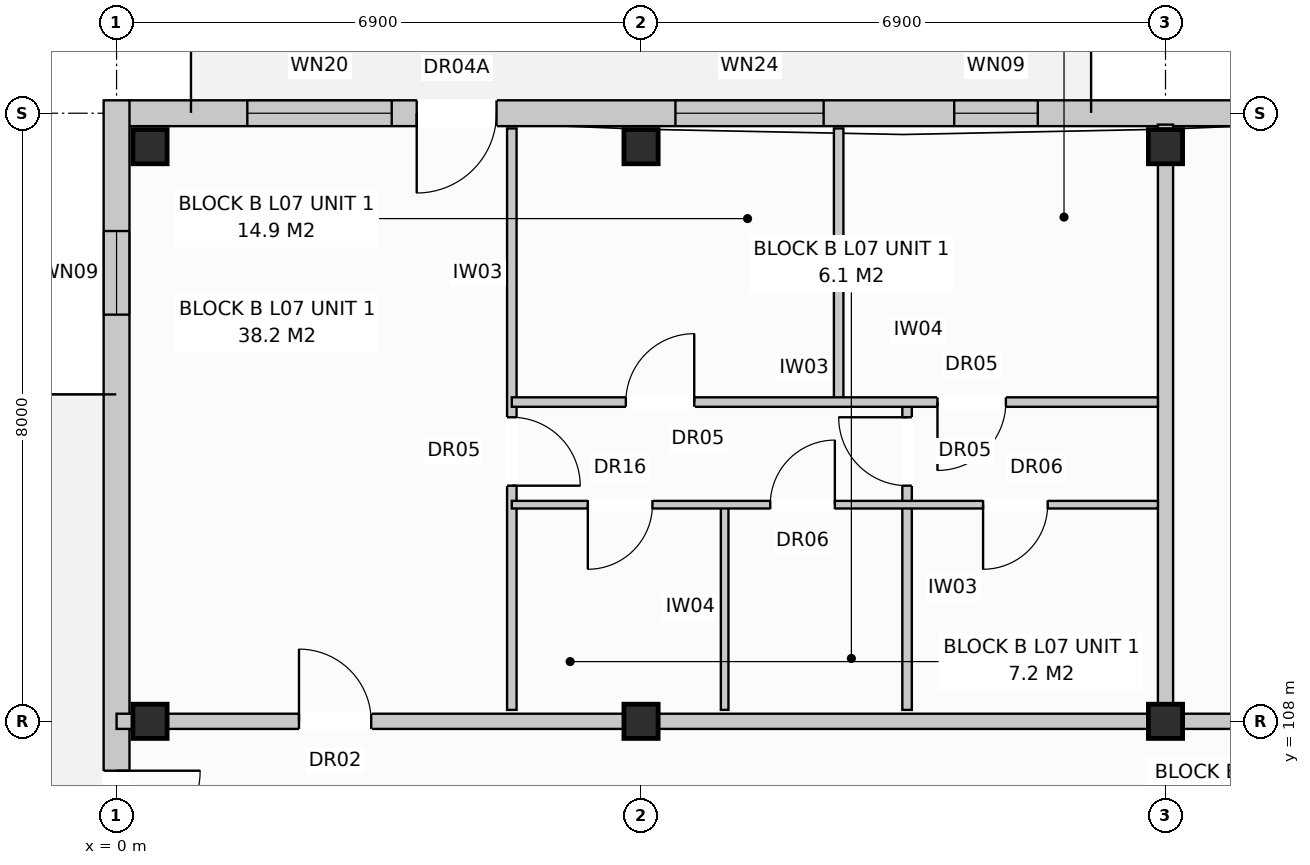
"""IFC4 building model, lengths in metres.
Left out: names, types, materials, properties, quantities, classifications, styles, units other than length and angle.
Written with IfcOpenShell. Run it as: python <this file> out.ifc"""

import sys

from ifc_helpers import new_model, si_unit, direction, frame, frame_2d, origin, origin_with_axes, origin_2d, place, context, subcontext, project, spatial, rectangle, extrude, element, fill, save


model = new_model("IFC4")
c1 = context("Model", 3, precision=1e-05, world=origin(), true_north=direction((0.0, 1.0)))
c2 = subcontext(c1, "Body", "Model", "MODEL_VIEW")
j1 = project(units=[si_unit("LENGTHUNIT", "METRE"), si_unit("PLANEANGLEUNIT", "RADIAN")], contexts=[c1])
p1 = place(None, origin())
s1 = spatial("IfcSite", under=j1, at=p1, CompositionType="ELEMENT")
p2 = place(p1, origin())
s2 = spatial("IfcBuilding", under=s1, at=p2, CompositionType="ELEMENT")
p3 = place(p2, frame((0.0, 0.0, 24.0)))
s3 = spatial("IfcBuildingStorey", under=s2, at=p3, CompositionType="ELEMENT", Elevation=24.0)
for number, where, z_axis, x_axis in (
    (1, (0.44, 108.0, 0.0), (0.0, 0.0, 1.0), (1.0, 0.0, 0.0)),
    (2, (0.44, 115.56, 0.0), (0.0, 0.0, 1.0), (1.0, 0.0, 0.0)),
    (3, (6.9, 108.0, 0.0), (0.0, 0.0, 1.0), (1.0, 0.0, 0.0)),
    (4, (6.9, 115.56, 0.0), (0.0, 0.0, 1.0), (1.0, 0.0, 0.0)),
    (5, (13.8, 108.0, 0.0), (0.0, 0.0, 1.0), (1.0, 0.0, 0.0)),
    (6, (13.8, 115.56, 0.0), (0.0, 0.0, 1.0), (1.0, 0.0, 0.0)),
):
    element("IfcColumn", number, at=place(p3, frame(where, z_axis=z_axis, x_axis=x_axis)), inside=s3, PredefinedType="COLUMN", context=c2, shape_type="SweptSolid", body=[
        extrude(rectangle(XDim=0.45, YDim=0.45, at=origin_2d()), origin(), (0.0, 0.0, 1.0), 3.2),
    ])
p4 = place(p3, frame((0.16, 116.0, 0.0), z_axis=(0.0, 0.0, 1.0), x_axis=(1.0, 0.0, 0.0)))
e7 = element("IfcWall", 7, at=p4, inside=s3, PredefinedType="STANDARD", context=c2, shape_type="SweptSolid", body=[
    extrude(rectangle(XDim=41.08, YDim=0.34, at=frame_2d((20.54, 0.0))), origin(), (0.0, 0.0, 1.0), 2.95),
])
p5 = place(p4, frame((3.789, 0.0, 0.0)))
e8 = element("IfcOpeningElement", 8, at=p5, cuts=e7, PredefinedType="OPENING", context=c2, shape_type="SweptSolid", body=[
    extrude(rectangle(XDim=1.05, YDim=2.12, at=frame_2d((0.525, 1.06))), frame((0.0, 0.182, 0.0), z_axis=(0.0, -1.0, 0.0), x_axis=(1.0, 0.0, 0.0)), (0.0, 0.0, 1.0), 0.364),
])
p6 = place(p4, frame((18.689, 0.0, 0.0)))
e9 = element("IfcOpeningElement", 9, at=p6, cuts=e7, PredefinedType="OPENING", context=c2, shape_type="SweptSolid", body=[
    extrude(rectangle(XDim=1.05, YDim=2.12, at=frame_2d((0.525, 1.06))), frame((0.0, 0.182, 0.0), z_axis=(0.0, -1.0, 0.0), x_axis=(1.0, 0.0, 0.0)), (0.0, 0.0, 1.0), 0.364),
])
p7 = place(p4, frame((29.089, 0.0, 0.0)))
e10 = element("IfcOpeningElement", 10, at=p7, cuts=e7, PredefinedType="OPENING", context=c2, shape_type="SweptSolid", body=[
    extrude(rectangle(XDim=1.05, YDim=2.12, at=frame_2d((0.525, 1.06))), frame((0.0, 0.182, 0.0), z_axis=(0.0, -1.0, 0.0), x_axis=(1.0, 0.0, 0.0)), (0.0, 0.0, 1.0), 0.364),
])
p8 = place(p4, frame((1.56, 0.0, 0.8)))
e11 = element("IfcOpeningElement", 11, at=p8, cuts=e7, PredefinedType="OPENING", context=c2, shape_type="SweptSolid", body=[
    extrude(rectangle(XDim=1.9, YDim=1.85, at=frame_2d((0.95, 0.925))), frame((0.0, 0.182, 0.0), z_axis=(0.0, -1.0, 0.0), x_axis=(1.0, 0.0, 0.0)), (0.0, 0.0, 1.0), 0.364),
])
p9 = place(p4, frame((7.192, 0.0, 0.8)))
e12 = element("IfcOpeningElement", 12, at=p9, cuts=e7, PredefinedType="OPENING", context=c2, shape_type="SweptSolid", body=[
    extrude(rectangle(XDim=1.95, YDim=1.65, at=frame_2d((0.975, 0.825))), frame((0.0, 0.182, 0.0), z_axis=(0.0, -1.0, 0.0), x_axis=(1.0, 0.0, 0.0)), (0.0, 0.0, 1.0), 0.364),
])
p10 = place(p4, frame((10.86, 0.0, 0.72)))
e13 = element("IfcOpeningElement", 13, at=p10, cuts=e7, PredefinedType="OPENING", context=c2, shape_type="SweptSolid", body=[
    extrude(rectangle(XDim=1.1, YDim=1.5, at=frame_2d((0.55, 0.75))), frame((0.0, 0.182, 0.0), z_axis=(0.0, -1.0, 0.0), x_axis=(1.0, 0.0, 0.0)), (0.0, 0.0, 1.0), 0.364),
])
p11 = place(p4, frame((15.86, 0.0, 0.8)))
e14 = element("IfcOpeningElement", 14, at=p11, cuts=e7, PredefinedType="OPENING", context=c2, shape_type="SweptSolid", body=[
    extrude(rectangle(XDim=1.9, YDim=1.85, at=frame_2d((0.95, 0.925))), frame((0.0, 0.182, 0.0), z_axis=(0.0, -1.0, 0.0), x_axis=(1.0, 0.0, 0.0)), (0.0, 0.0, 1.0), 0.364),
])
p12 = place(p4, frame((21.535, 0.0, 0.8)))
e15 = element("IfcOpeningElement", 15, at=p12, cuts=e7, PredefinedType="OPENING", context=c2, shape_type="SweptSolid", body=[
    extrude(rectangle(XDim=1.95, YDim=1.65, at=frame_2d((0.975, 0.825))), frame((0.0, 0.182, 0.0), z_axis=(0.0, -1.0, 0.0), x_axis=(1.0, 0.0, 0.0)), (0.0, 0.0, 1.0), 0.364),
])
p13 = place(p4, frame((25.61, 0.0, 0.72)))
e16 = element("IfcOpeningElement", 16, at=p13, cuts=e7, PredefinedType="OPENING", context=c2, shape_type="SweptSolid", body=[
    extrude(rectangle(XDim=1.1, YDim=1.5, at=frame_2d((0.55, 0.75))), frame((0.0, 0.182, 0.0), z_axis=(0.0, -1.0, 0.0), x_axis=(1.0, 0.0, 0.0)), (0.0, 0.0, 1.0), 0.364),
])
p14 = place(p4, frame((31.36, 0.0, 0.72)))
e17 = element("IfcOpeningElement", 17, at=p14, cuts=e7, PredefinedType="OPENING", context=c2, shape_type="SweptSolid", body=[
    extrude(rectangle(XDim=1.9, YDim=1.85, at=frame_2d((0.95, 0.925))), frame((0.0, 0.182, 0.0), z_axis=(0.0, -1.0, 0.0), x_axis=(1.0, 0.0, 0.0)), (0.0, 0.0, 1.0), 0.364),
])
p15 = place(p4, frame((35.335, 0.0, 0.8)))
e18 = element("IfcOpeningElement", 18, at=p15, cuts=e7, PredefinedType="OPENING", context=c2, shape_type="SweptSolid", body=[
    extrude(rectangle(XDim=1.95, YDim=1.65, at=frame_2d((0.975, 0.825))), frame((0.0, 0.182, 0.0), z_axis=(0.0, -1.0, 0.0), x_axis=(1.0, 0.0, 0.0)), (0.0, 0.0, 1.0), 0.364),
])
p16 = place(p4, frame((39.16, 0.0, 0.72)))
e19 = element("IfcOpeningElement", 19, at=p16, cuts=e7, PredefinedType="OPENING", context=c2, shape_type="SweptSolid", body=[
    extrude(rectangle(XDim=1.1, YDim=1.5, at=frame_2d((0.55, 0.75))), frame((0.0, 0.182, 0.0), z_axis=(0.0, -1.0, 0.0), x_axis=(1.0, 0.0, 0.0)), (0.0, 0.0, 1.0), 0.364),
])
p17 = place(p3, frame((0.0, 97.43, 0.0), z_axis=(0.0, 0.0, 1.0), x_axis=(0.0, 1.0, 0.0)))
e20 = element("IfcWall", 20, at=p17, inside=s3, PredefinedType="STANDARD", context=c2, shape_type="SweptSolid", body=[
    extrude(rectangle(XDim=18.74, YDim=0.34, at=frame_2d((9.37, 0.0))), origin(), (0.0, 0.0, 1.0), 2.95),
])
p18 = place(p17, frame((8.82, 0.0, 0.0)))
e21 = element("IfcOpeningElement", 21, at=p18, cuts=e20, PredefinedType="OPENING", context=c2, shape_type="SweptSolid", body=[
    extrude(rectangle(XDim=1.1, YDim=2.1, at=frame_2d((0.55, 1.05))), frame((0.0, 0.182, 0.0), z_axis=(0.0, -1.0, 0.0), x_axis=(1.0, 0.0, 0.0)), (0.0, 0.0, 1.0), 0.364),
])
p19 = place(p17, frame((1.72, 0.0, 0.72)))
e22 = element("IfcOpeningElement", 22, at=p19, cuts=e20, PredefinedType="OPENING", context=c2, shape_type="SweptSolid", body=[
    extrude(rectangle(XDim=1.1, YDim=1.5, at=frame_2d((0.55, 0.75))), frame((0.0, 0.182, 0.0), z_axis=(0.0, -1.0, 0.0), x_axis=(1.0, 0.0, 0.0)), (0.0, 0.0, 1.0), 0.364),
])
p20 = place(p17, frame((15.92, 0.0, 0.72)))
e23 = element("IfcOpeningElement", 23, at=p20, cuts=e20, PredefinedType="OPENING", context=c2, shape_type="SweptSolid", body=[
    extrude(rectangle(XDim=1.1, YDim=1.5, at=frame_2d((0.55, 0.75))), frame((0.0, 0.182, 0.0), z_axis=(0.0, -1.0, 0.0), x_axis=(1.0, 0.0, 0.0)), (0.0, 0.0, 1.0), 0.364),
])
p21 = place(p3, frame((13.8, 108.15, 0.0), z_axis=(0.0, 0.0, 1.0), x_axis=(0.0, 1.0, 0.0)))
e24 = element("IfcWall", 24, at=p21, inside=s3, PredefinedType="PARTITIONING", context=c2, shape_type="SweptSolid", body=[
    extrude(rectangle(XDim=7.7, YDim=0.2, at=frame_2d((3.85, 0.0))), origin(), (0.0, 0.0, 1.0), 2.95),
])
p22 = place(p3, frame((0.0, 108.0, 0.0), z_axis=(0.0, 0.0, 1.0), x_axis=(1.0, 0.0, 0.0)))
e25 = element("IfcWall", 25, at=p22, inside=s3, PredefinedType="PARTITIONING", context=c2, shape_type="SweptSolid", body=[
    extrude(rectangle(XDim=13.8, YDim=0.2, at=frame_2d((6.9, 0.0))), origin(), (0.0, 0.0, 1.0), 2.39),
])
p23 = place(p22, frame((2.4, 0.0, 0.0)))
e26 = element("IfcOpeningElement", 26, at=p23, cuts=e25, PredefinedType="OPENING", context=c2, shape_type="SweptSolid", body=[
    extrude(rectangle(XDim=0.95, YDim=2.15, at=frame_2d((0.475, 1.075))), frame((0.0, 0.112, 0.0), z_axis=(0.0, -1.0, 0.0), x_axis=(1.0, 0.0, 0.0)), (0.0, 0.0, 1.0), 0.224),
])
p24 = place(p3, frame((5.2, 108.15, 0.0), z_axis=(0.0, 0.0, 1.0), x_axis=(0.0, 1.0, 0.0)))
e27 = element("IfcWall", 27, at=p24, inside=s3, PredefinedType="PARTITIONING", context=c2, shape_type="SweptSolid", body=[
    extrude(rectangle(XDim=7.65, YDim=0.125, at=frame_2d((3.825, 0.0))), origin(), (0.0, 0.0, 1.0), 2.95),
])
p25 = place(p24, frame((2.95, 0.0, 0.0)))
e28 = element("IfcOpeningElement", 28, at=p25, cuts=e27, PredefinedType="OPENING", context=c2, shape_type="SweptSolid", body=[
    extrude(rectangle(XDim=0.9, YDim=2.1, at=frame_2d((0.45, 1.05))), frame((0.0, 0.074, 0.0), z_axis=(0.0, -1.0, 0.0), x_axis=(1.0, 0.0, 0.0)), (0.0, 0.0, 1.0), 0.149),
])
p26 = place(p3, frame((8.0, 108.15, 0.0), z_axis=(0.0, 0.0, 1.0), x_axis=(0.0, 1.0, 0.0)))
e29 = element("IfcWall", 29, at=p26, inside=s3, PredefinedType="PARTITIONING", context=c2, shape_type="SweptSolid", body=[
    extrude(rectangle(XDim=2.7, YDim=0.1, at=frame_2d((1.35, 0.0))), origin(), (0.0, 0.0, 1.0), 2.95),
])
p27 = place(p3, frame((10.4, 108.15, 0.0), z_axis=(0.0, 0.0, 1.0), x_axis=(0.0, 1.0, 0.0)))
e30 = element("IfcWall", 30, at=p27, inside=s3, PredefinedType="PARTITIONING", context=c2, shape_type="SweptSolid", body=[
    extrude(rectangle(XDim=4.05, YDim=0.125, at=frame_2d((2.025, 0.0))), origin(), (0.0, 0.0, 1.0), 2.95),
])
p28 = place(p27, frame((2.95, 0.0, 0.0)))
e31 = element("IfcOpeningElement", 31, at=p28, cuts=e30, PredefinedType="OPENING", context=c2, shape_type="SweptSolid", body=[
    extrude(rectangle(XDim=0.9, YDim=2.1, at=frame_2d((0.45, 1.05))), frame((0.0, 0.074, 0.0), z_axis=(0.0, -1.0, 0.0), x_axis=(1.0, 0.0, 0.0)), (0.0, 0.0, 1.0), 0.149),
])
p29 = place(p3, frame((9.5, 112.2, 0.0), z_axis=(0.0, 0.0, 1.0), x_axis=(0.0, 1.0, 0.0)))
e32 = element("IfcWall", 32, at=p29, inside=s3, PredefinedType="PARTITIONING", context=c2, shape_type="SweptSolid", body=[
    extrude(rectangle(XDim=3.6, YDim=0.125, at=frame_2d((1.8, 0.0))), origin(), (0.0, 0.0, 1.0), 2.95),
])
p30 = place(p3, frame((5.2, 110.85, 0.0), z_axis=(0.0, 0.0, 1.0), x_axis=(1.0, 0.0, 0.0)))
e33 = element("IfcWall", 33, at=p30, inside=s3, PredefinedType="PARTITIONING", context=c2, shape_type="SweptSolid", body=[
    extrude(rectangle(XDim=8.5, YDim=0.1, at=frame_2d((4.25, 0.0))), origin(), (0.0, 0.0, 1.0), 2.95),
])
p31 = place(p30, frame((1.0, 0.0, 0.0)))
e34 = element("IfcOpeningElement", 34, at=p31, cuts=e33, PredefinedType="OPENING", context=c2, shape_type="SweptSolid", body=[
    extrude(rectangle(XDim=0.85, YDim=2.1, at=frame_2d((0.425, 1.05))), frame((0.0, 0.062, 0.0), z_axis=(0.0, -1.0, 0.0), x_axis=(1.0, 0.0, 0.0)), (0.0, 0.0, 1.0), 0.124),
])
p32 = place(p30, frame((3.4, 0.0, 0.0)))
e35 = element("IfcOpeningElement", 35, at=p32, cuts=e33, PredefinedType="OPENING", context=c2, shape_type="SweptSolid", body=[
    extrude(rectangle(XDim=0.85, YDim=2.05, at=frame_2d((0.425, 1.025))), frame((0.0, 0.062, 0.0), z_axis=(0.0, -1.0, 0.0), x_axis=(1.0, 0.0, 0.0)), (0.0, 0.0, 1.0), 0.124),
])
p33 = place(p30, frame((6.2, 0.0, 0.0)))
e36 = element("IfcOpeningElement", 36, at=p33, cuts=e33, PredefinedType="OPENING", context=c2, shape_type="SweptSolid", body=[
    extrude(rectangle(XDim=0.85, YDim=2.05, at=frame_2d((0.425, 1.025))), frame((0.0, 0.062, 0.0), z_axis=(0.0, -1.0, 0.0), x_axis=(1.0, 0.0, 0.0)), (0.0, 0.0, 1.0), 0.124),
])
p34 = place(p3, frame((5.2, 112.2, 0.0), z_axis=(0.0, 0.0, 1.0), x_axis=(1.0, 0.0, 0.0)))
e37 = element("IfcWall", 37, at=p34, inside=s3, PredefinedType="PARTITIONING", context=c2, shape_type="SweptSolid", body=[
    extrude(rectangle(XDim=8.5, YDim=0.125, at=frame_2d((4.25, 0.0))), origin(), (0.0, 0.0, 1.0), 2.95),
])
p35 = place(p34, frame((1.5, 0.0, 0.0)))
e38 = element("IfcOpeningElement", 38, at=p35, cuts=e37, PredefinedType="OPENING", context=c2, shape_type="SweptSolid", body=[
    extrude(rectangle(XDim=0.9, YDim=2.1, at=frame_2d((0.45, 1.05))), frame((0.0, 0.074, 0.0), z_axis=(0.0, -1.0, 0.0), x_axis=(1.0, 0.0, 0.0)), (0.0, 0.0, 1.0), 0.149),
])
p36 = place(p34, frame((5.6, 0.0, 0.0)))
e39 = element("IfcOpeningElement", 39, at=p36, cuts=e37, PredefinedType="OPENING", context=c2, shape_type="SweptSolid", body=[
    extrude(rectangle(XDim=0.9, YDim=2.1, at=frame_2d((0.45, 1.05))), frame((0.0, 0.074, 0.0), z_axis=(0.0, -1.0, 0.0), x_axis=(1.0, 0.0, 0.0)), (0.0, 0.0, 1.0), 0.149),
])
p37 = place(p3, frame((13.8, 108.0, 0.0), z_axis=(0.0, 0.0, 1.0), x_axis=(1.0, 0.0, 0.0)))
e40 = element("IfcWall", 40, at=p37, inside=s3, PredefinedType="PARTITIONING", context=c2, shape_type="SweptSolid", body=[
    extrude(rectangle(XDim=20.7, YDim=0.2, at=frame_2d((10.35, 0.0))), origin(), (0.0, 0.0, 1.0), 2.39),
])
p38 = place(p37, frame((2.4, 0.0, 0.0)))
e41 = element("IfcOpeningElement", 41, at=p38, cuts=e40, PredefinedType="OPENING", context=c2, shape_type="SweptSolid", body=[
    extrude(rectangle(XDim=0.95, YDim=2.15, at=frame_2d((0.475, 1.075))), frame((0.0, 0.112, 0.0), z_axis=(0.0, -1.0, 0.0), x_axis=(1.0, 0.0, 0.0)), (0.0, 0.0, 1.0), 0.224),
])
p39 = place(p5, frame((1.05, 0.0, 0.0), z_axis=(0.0, 0.0, 1.0), x_axis=(-1.0, 0.0, 0.0)))
e42 = element("IfcDoor", 42, at=p39, inside=s3, OperationType="SINGLE_SWING_LEFT", PredefinedType="DOOR", context=c2, shape_type="SweptSolid", body=[
    extrude(rectangle(XDim=1.05, YDim=2.12, at=frame_2d((0.525, 1.06))), frame((0.0, 0.025, 0.0), z_axis=(0.0, -1.0, 0.0), x_axis=(1.0, 0.0, 0.0)), (0.0, 0.0, 1.0), 0.05),
])
fill(e8, e42)
p40 = place(p8, origin_with_axes())
e43 = element("IfcWindow", 43, at=p40, inside=s3, PartitioningType="SINGLE_PANEL", PredefinedType="WINDOW", context=c2, shape_type="SweptSolid", body=[
    extrude(rectangle(XDim=1.9, YDim=1.85, at=frame_2d((0.95, 0.925))), frame((0.0, 0.03, 0.0), z_axis=(0.0, -1.0, 0.0), x_axis=(1.0, 0.0, 0.0)), (0.0, 0.0, 1.0), 0.06),
])
fill(e11, e43)
p41 = place(p9, origin_with_axes())
e44 = element("IfcWindow", 44, at=p41, inside=s3, PartitioningType="SINGLE_PANEL", PredefinedType="WINDOW", context=c2, shape_type="SweptSolid", body=[
    extrude(rectangle(XDim=1.95, YDim=1.65, at=frame_2d((0.975, 0.825))), frame((0.0, 0.03, 0.0), z_axis=(0.0, -1.0, 0.0), x_axis=(1.0, 0.0, 0.0)), (0.0, 0.0, 1.0), 0.06),
])
fill(e12, e44)
p42 = place(p10, origin_with_axes())
e45 = element("IfcWindow", 45, at=p42, inside=s3, PartitioningType="SINGLE_PANEL", PredefinedType="WINDOW", context=c2, shape_type="SweptSolid", body=[
    extrude(rectangle(XDim=1.1, YDim=1.5, at=frame_2d((0.55, 0.75))), frame((0.0, 0.03, 0.0), z_axis=(0.0, -1.0, 0.0), x_axis=(1.0, 0.0, 0.0)), (0.0, 0.0, 1.0), 0.06),
])
fill(e13, e45)
p43 = place(p18, frame((1.1, 0.0, 0.0), z_axis=(0.0, 0.0, 1.0), x_axis=(-1.0, 0.0, 0.0)))
e46 = element("IfcDoor", 46, at=p43, inside=s3, OperationType="SINGLE_SWING_RIGHT", PredefinedType="DOOR", context=c2, shape_type="SweptSolid", body=[
    extrude(rectangle(XDim=1.1, YDim=2.1, at=frame_2d((0.55, 1.05))), frame((0.0, 0.025, 0.0), z_axis=(0.0, -1.0, 0.0), x_axis=(1.0, 0.0, 0.0)), (0.0, 0.0, 1.0), 0.05),
])
fill(e21, e46)
p44 = place(p20, origin_with_axes())
e47 = element("IfcWindow", 47, at=p44, inside=s3, PartitioningType="SINGLE_PANEL", PredefinedType="WINDOW", context=c2, shape_type="SweptSolid", body=[
    extrude(rectangle(XDim=1.1, YDim=1.5, at=frame_2d((0.55, 0.75))), frame((0.0, 0.03, 0.0), z_axis=(0.0, -1.0, 0.0), x_axis=(1.0, 0.0, 0.0)), (0.0, 0.0, 1.0), 0.06),
])
fill(e23, e47)
p45 = place(p23, origin_with_axes())
e48 = element("IfcDoor", 48, at=p45, inside=s3, OperationType="SINGLE_SWING_LEFT", PredefinedType="DOOR", context=c2, shape_type="SweptSolid", body=[
    extrude(rectangle(XDim=0.95, YDim=2.15, at=frame_2d((0.475, 1.075))), frame((0.0, 0.025, 0.0), z_axis=(0.0, -1.0, 0.0), x_axis=(1.0, 0.0, 0.0)), (0.0, 0.0, 1.0), 0.05),
])
fill(e26, e48)
p46 = place(p25, frame((0.9, 0.0, 0.0), z_axis=(0.0, 0.0, 1.0), x_axis=(-1.0, 0.0, 0.0)))
e49 = element("IfcDoor", 49, at=p46, inside=s3, OperationType="SINGLE_SWING_LEFT", PredefinedType="DOOR", context=c2, shape_type="SweptSolid", body=[
    extrude(rectangle(XDim=0.9, YDim=2.1, at=frame_2d((0.45, 1.05))), frame((0.0, 0.025, 0.0), z_axis=(0.0, -1.0, 0.0), x_axis=(1.0, 0.0, 0.0)), (0.0, 0.0, 1.0), 0.05),
])
fill(e28, e49)
p47 = place(p28, origin_with_axes())
e50 = element("IfcDoor", 50, at=p47, inside=s3, OperationType="SINGLE_SWING_RIGHT", PredefinedType="DOOR", context=c2, shape_type="SweptSolid", body=[
    extrude(rectangle(XDim=0.9, YDim=2.1, at=frame_2d((0.45, 1.05))), frame((0.0, 0.025, 0.0), z_axis=(0.0, -1.0, 0.0), x_axis=(1.0, 0.0, 0.0)), (0.0, 0.0, 1.0), 0.05),
])
fill(e31, e50)
p48 = place(p31, frame((0.85, 0.0, 0.0), z_axis=(0.0, 0.0, 1.0), x_axis=(-1.0, 0.0, 0.0)))
e51 = element("IfcDoor", 51, at=p48, inside=s3, OperationType="SINGLE_SWING_LEFT", PredefinedType="DOOR", context=c2, shape_type="SweptSolid", body=[
    extrude(rectangle(XDim=0.85, YDim=2.1, at=frame_2d((0.425, 1.05))), frame((0.0, 0.025, 0.0), z_axis=(0.0, -1.0, 0.0), x_axis=(1.0, 0.0, 0.0)), (0.0, 0.0, 1.0), 0.05),
])
fill(e34, e51)
p49 = place(p32, origin_with_axes())
e52 = element("IfcDoor", 52, at=p49, inside=s3, OperationType="SINGLE_SWING_RIGHT", PredefinedType="DOOR", context=c2, shape_type="SweptSolid", body=[
    extrude(rectangle(XDim=0.85, YDim=2.05, at=frame_2d((0.425, 1.025))), frame((0.0, 0.025, 0.0), z_axis=(0.0, -1.0, 0.0), x_axis=(1.0, 0.0, 0.0)), (0.0, 0.0, 1.0), 0.05),
])
fill(e35, e52)
p50 = place(p33, frame((0.85, 0.0, 0.0), z_axis=(0.0, 0.0, 1.0), x_axis=(-1.0, 0.0, 0.0)))
e53 = element("IfcDoor", 53, at=p50, inside=s3, OperationType="SINGLE_SWING_LEFT", PredefinedType="DOOR", context=c2, shape_type="SweptSolid", body=[
    extrude(rectangle(XDim=0.85, YDim=2.05, at=frame_2d((0.425, 1.025))), frame((0.0, 0.025, 0.0), z_axis=(0.0, -1.0, 0.0), x_axis=(1.0, 0.0, 0.0)), (0.0, 0.0, 1.0), 0.05),
])
fill(e36, e53)
p51 = place(p35, origin_with_axes())
e54 = element("IfcDoor", 54, at=p51, inside=s3, OperationType="SINGLE_SWING_RIGHT", PredefinedType="DOOR", context=c2, shape_type="SweptSolid", body=[
    extrude(rectangle(XDim=0.9, YDim=2.1, at=frame_2d((0.45, 1.05))), frame((0.0, 0.025, 0.0), z_axis=(0.0, -1.0, 0.0), x_axis=(1.0, 0.0, 0.0)), (0.0, 0.0, 1.0), 0.05),
])
fill(e38, e54)
p52 = place(p36, frame((0.9, 0.0, 0.0), z_axis=(0.0, 0.0, 1.0), x_axis=(-1.0, 0.0, 0.0)))
e55 = element("IfcDoor", 55, at=p52, inside=s3, OperationType="SINGLE_SWING_LEFT", PredefinedType="DOOR", context=c2, shape_type="SweptSolid", body=[
    extrude(rectangle(XDim=0.9, YDim=2.1, at=frame_2d((0.45, 1.05))), frame((0.0, 0.025, 0.0), z_axis=(0.0, -1.0, 0.0), x_axis=(1.0, 0.0, 0.0)), (0.0, 0.0, 1.0), 0.05),
])
fill(e39, e55)
save(model, sys.argv[1])
